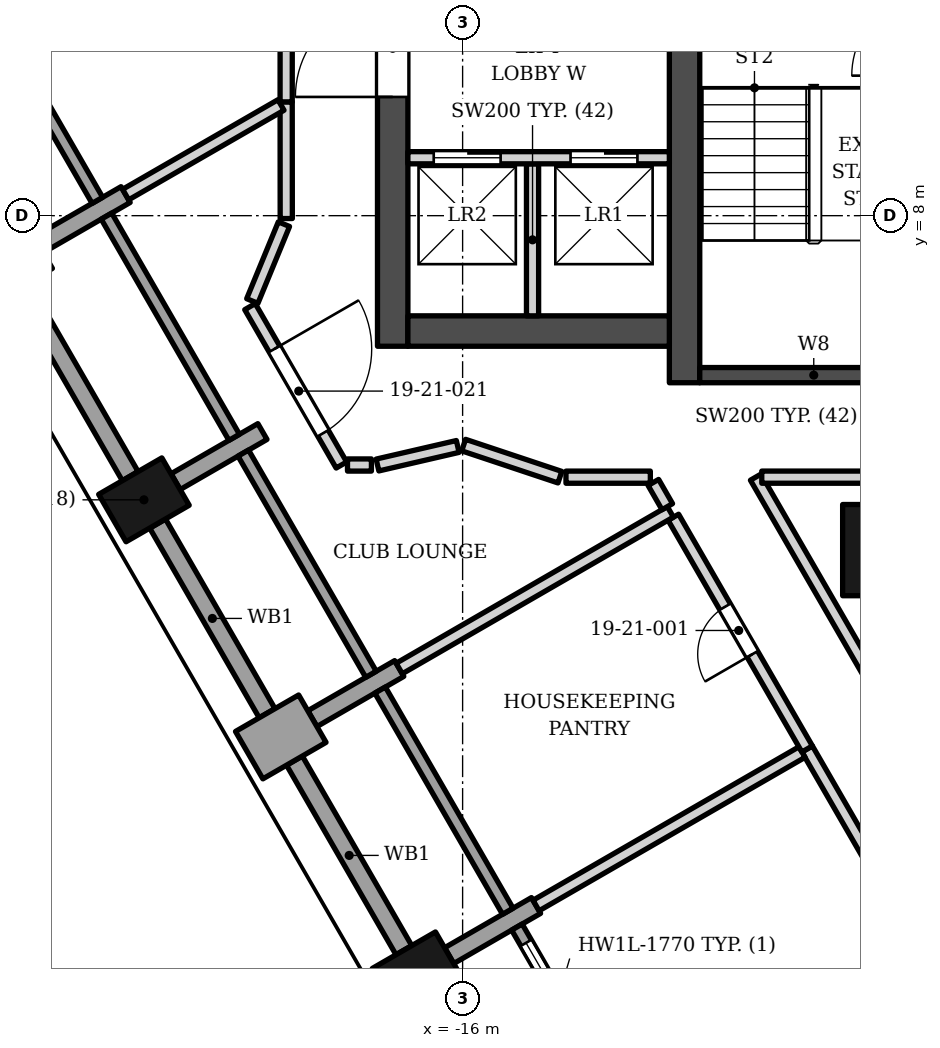
"""IFC4 building model, lengths in metres.
Left out: names, types, materials, properties, quantities, classifications, styles, units other than length and angle.
Written with IfcOpenShell. Run it as: python <this file> out.ifc"""

import sys

from ifc_helpers import new_model, si_unit, direction, frame, frame_2d, origin, origin_2d, place, context, subcontext, project, spatial, rectangle, extrude, element, fill, save


model = new_model("IFC4")
c1 = context("Model", 3, precision=1e-05, world=origin(), true_north=direction((0.0, 1.0)))
c2 = subcontext(c1, "Body", "Model", "MODEL_VIEW")
j1 = project(units=[si_unit("LENGTHUNIT", "METRE"), si_unit("PLANEANGLEUNIT", "RADIAN")], contexts=[c1])
p1 = place(None, origin())
s1 = spatial("IfcSite", under=j1, at=p1, CompositionType="ELEMENT")
p2 = place(p1, origin())
s2 = spatial("IfcBuilding", under=s1, at=p2, CompositionType="ELEMENT")
p3 = place(p2, frame((0.0, 0.0, 91.8)))
s3 = spatial("IfcBuildingStorey", under=s2, at=p3, CompositionType="ELEMENT", Elevation=91.8)
p4 = place(p3, frame((-12.35, 5.253, 0.0), z_axis=(0.0, 0.0, 1.0), x_axis=(0.0, 1.0, 0.0)))
e1 = element("IfcWall", 1, at=p4, inside=s3, PredefinedType="SHEAR", context=c2, shape_type="SweptSolid", body=[
    extrude(rectangle(XDim=13.3, YDim=0.5, at=frame_2d((6.65, 0.0))), origin(), (0.0, 0.0, 1.0), 3.4),
])
p5 = place(p3, frame((-12.1, 5.378, 0.0), z_axis=(0.0, 0.0, 1.0), x_axis=(1.0, 0.0, 0.0)))
e2 = element("IfcWall", 2, at=p5, inside=s3, PredefinedType="SHEAR", context=c2, shape_type="SweptSolid", body=[
    extrude(rectangle(XDim=3.75, YDim=0.25, at=frame_2d((1.875, 0.0))), origin(), (0.0, 0.0, 1.0), 3.4),
])
p6 = place(p3, frame((-12.6, 6.103, 0.0), z_axis=(0.0, 0.0, 1.0), x_axis=(-1.0, 0.0, 0.0)))
e3 = element("IfcWall", 3, at=p6, inside=s3, PredefinedType="SHEAR", context=c2, shape_type="SweptSolid", body=[
    extrude(rectangle(XDim=4.3, YDim=0.5, at=frame_2d((2.15, 0.0))), origin(), (0.0, 0.0, 1.0), 3.4),
])
p7 = place(p3, frame((-17.15, 5.853, 0.0), z_axis=(0.0, 0.0, 1.0), x_axis=(0.0, 1.0, 0.0)))
e4 = element("IfcWall", 4, at=p7, inside=s3, PredefinedType="SHEAR", context=c2, shape_type="SweptSolid", body=[
    extrude(rectangle(XDim=13.2, YDim=0.5, at=frame_2d((6.6, 0.0))), origin(), (0.0, 0.0, 1.0), 3.4),
])
p8 = place(p7, frame((4.1, 0.0, 0.0)))
e5 = element("IfcOpeningElement", 5, at=p8, cuts=e4, PredefinedType="OPENING", context=c2, shape_type="SweptSolid", body=[
    extrude(rectangle(XDim=1.6, YDim=2.1, at=frame_2d((0.8, 1.05))), frame((0.0, 0.26, 0.0), z_axis=(0.0, -1.0, 0.0), x_axis=(1.0, 0.0, 0.0)), (0.0, 0.0, 1.0), 0.52),
])
p9 = place(p7, frame((9.75, 0.0, 0.0)))
e6 = element("IfcOpeningElement", 6, at=p9, cuts=e4, PredefinedType="OPENING", context=c2, shape_type="SweptSolid", body=[
    extrude(rectangle(XDim=0.9, YDim=2.1, at=frame_2d((0.45, 1.05))), frame((0.0, 0.26, 0.0), z_axis=(0.0, -1.0, 0.0), x_axis=(1.0, 0.0, 0.0)), (0.0, 0.0, 1.0), 0.52),
])
p10 = place(p3, frame((-9.0, 2.5, 0.0), z_axis=(0.0, 0.0, 1.0), x_axis=(1.0, 0.0, 0.0)))
e7 = element("IfcColumn", 7, at=p10, inside=s3, PredefinedType="COLUMN", context=c2, shape_type="SweptSolid", body=[
    extrude(rectangle(XDim=1.5, YDim=1.5, at=origin_2d()), origin(), (0.0, 0.0, 1.0), 3.4),
])
for number, where, z_axis, x_axis in (
    (8, (-21.241, 3.327, 0.0), (0.0, 0.0, 1.0), (0.5, -0.866, 0.0)),
    (9, (-16.741, -4.469, 0.0), (0.0, 0.0, 1.0), (0.5, -0.866, 0.0)),
):
    element("IfcColumn", number, at=place(p3, frame(where, z_axis=z_axis, x_axis=x_axis)), inside=s3, PredefinedType="COLUMN", context=c2, shape_type="SweptSolid", body=[
        extrude(rectangle(XDim=0.9, YDim=1.2, at=origin_2d()), origin(), (0.0, 0.0, 1.0), 3.4),
    ])
p11 = place(p3, frame((-24.01, 6.922, 0.0), z_axis=(0.0, 0.0, 1.0), x_axis=(0.865955154139, 0.50012165622, 0.0)))
e10 = element("IfcWall", 10, at=p11, inside=s3, PredefinedType="SOLIDWALL", context=c2, shape_type="SweptSolid", body=[
    extrude(rectangle(XDim=1.2, YDim=0.9, at=frame_2d((0.6, 0.0))), origin(), (0.0, 0.0, 1.0), 2.63),
])
p12 = place(p3, frame((-22.971, 7.522, 0.0), z_axis=(0.0, 0.0, 1.0), x_axis=(0.866040211805, 0.499974350878, 0.0)))
e11 = element("IfcWall", 11, at=p12, inside=s3, PredefinedType="SOLIDWALL", context=c2, shape_type="SweptSolid", body=[
    extrude(rectangle(XDim=1.65, YDim=0.3, at=frame_2d((0.825, 0.0))), origin(), (0.0, 0.0, 1.0), 2.65),
])
p13 = place(p3, frame((-19.292, 4.45, 0.0), z_axis=(0.0, 0.0, 1.0), x_axis=(-0.865993292597, -0.500055614084, 0.0)))
e12 = element("IfcWall", 12, at=p13, inside=s3, PredefinedType="SOLIDWALL", context=c2, shape_type="SweptSolid", body=[
    extrude(rectangle(XDim=1.649, YDim=0.3, at=frame_2d((0.825, 0.0))), origin(), (0.0, 0.0, 1.0), 2.45),
])
p14 = place(p3, frame((-19.51, -0.872, 0.0), z_axis=(0.0, 0.0, 1.0), x_axis=(0.865955154139, 0.50012165622, 0.0)))
e13 = element("IfcWall", 13, at=p14, inside=s3, PredefinedType="SOLIDWALL", context=c2, shape_type="SweptSolid", body=[
    extrude(rectangle(XDim=1.2, YDim=0.9, at=frame_2d((0.6, 0.0))), origin(), (0.0, 0.0, 1.0), 2.63),
])
p15 = place(p3, frame((-17.042, 0.553, 0.0), z_axis=(0.0, 0.0, 1.0), x_axis=(-0.866040211805, -0.499974350878, 0.0)))
e14 = element("IfcWall", 14, at=p15, inside=s3, PredefinedType="SOLIDWALL", context=c2, shape_type="SweptSolid", body=[
    extrude(rectangle(XDim=1.65, YDim=0.3, at=frame_2d((0.825, 0.0))), origin(), (0.0, 0.0, 1.0), 2.65),
])
p16 = place(p3, frame((-16.221, -4.169, 0.0), z_axis=(0.0, 0.0, 1.0), x_axis=(0.865976140824, 0.500085316245, 0.0)))
e15 = element("IfcWall", 15, at=p16, inside=s3, PredefinedType="SOLIDWALL", context=c2, shape_type="SweptSolid", body=[
    extrude(rectangle(XDim=1.65, YDim=0.3, at=frame_2d((0.825, 0.0))), origin(), (0.0, 0.0, 1.0), 2.65),
])
p17 = place(p3, frame((-24.107, 11.889, 0.0), z_axis=(0.0, 0.0, 1.0), x_axis=(0.500027713859, -0.866009402589, 0.0)))
e16 = element("IfcWall", 16, at=p17, inside=s3, PredefinedType="ELEMENTEDWALL", context=c2, shape_type="SweptSolid", body=[
    extrude(rectangle(XDim=4.2, YDim=0.2, at=frame_2d((2.1, 0.0))), origin(), (0.0, 0.0, 1.0), 2.65),
])
p18 = place(p3, frame((-21.467, 3.716, 0.0), z_axis=(0.0, 0.0, 1.0), x_axis=(-0.499984792966, 0.866034183392, 0.0)))
e17 = element("IfcWall", 17, at=p18, inside=s3, PredefinedType="SOLIDWALL", context=c2, shape_type="SweptSolid", body=[
    extrude(rectangle(XDim=3.598, YDim=0.3, at=frame_2d((1.799, 0.0))), origin(), (0.0, 0.0, 1.0), 2.63),
])
p19 = place(p3, frame((-21.857, 7.992, 0.0), z_axis=(0.0, 0.0, 1.0), x_axis=(0.500002543286, -0.866023935413, 0.0)))
e18 = element("IfcWall", 18, at=p19, inside=s3, PredefinedType="ELEMENTEDWALL", context=c2, shape_type="SweptSolid", body=[
    extrude(rectangle(XDim=4.2, YDim=0.2, at=frame_2d((2.1, 0.0))), origin(), (0.0, 0.0, 1.0), 2.65),
])
p20 = place(p3, frame((-21.016, 2.935, 0.0), z_axis=(0.0, 0.0, 1.0), x_axis=(0.499961193289, -0.866047807691, 0.0)))
e19 = element("IfcWall", 19, at=p20, inside=s3, PredefinedType="SOLIDWALL", context=c2, shape_type="SweptSolid", body=[
    extrude(rectangle(XDim=3.6, YDim=0.3, at=frame_2d((1.8, 0.0))), origin(), (0.0, 0.0, 1.0), 2.63),
])
p21 = place(p3, frame((-19.607, 4.095, 0.0), z_axis=(0.0, 0.0, 1.0), x_axis=(0.500027713859, -0.866009402589, 0.0)))
e20 = element("IfcWall", 20, at=p21, inside=s3, PredefinedType="ELEMENTEDWALL", context=c2, shape_type="SweptSolid", body=[
    extrude(rectangle(XDim=4.2, YDim=0.2, at=frame_2d((2.1, 0.0))), origin(), (0.0, 0.0, 1.0), 2.45),
])
p22 = place(p3, frame((-18.766, -0.962, 0.0), z_axis=(0.0, 0.0, 1.0), x_axis=(0.499961193289, -0.866047807691, 0.0)))
e21 = element("IfcWall", 21, at=p22, inside=s3, PredefinedType="SOLIDWALL", context=c2, shape_type="SweptSolid", body=[
    extrude(rectangle(XDim=3.6, YDim=0.3, at=frame_2d((1.8, 0.0))), origin(), (0.0, 0.0, 1.0), 2.63),
])
p23 = place(p3, frame((-17.357, 0.198, 0.0), z_axis=(0.0, 0.0, 1.0), x_axis=(0.500027713859, -0.866009402589, 0.0)))
e22 = element("IfcWall", 22, at=p23, inside=s3, PredefinedType="ELEMENTEDWALL", context=c2, shape_type="SweptSolid", body=[
    extrude(rectangle(XDim=4.2, YDim=0.2, at=frame_2d((2.1, 0.0))), origin(), (0.0, 0.0, 1.0), 2.65),
])
p24 = place(p3, frame((-15.107, -3.699, 0.0), z_axis=(0.0, 0.0, 1.0), x_axis=(0.500002543286, -0.866023935413, 0.0)))
e23 = element("IfcWall", 23, at=p24, inside=s3, PredefinedType="ELEMENTEDWALL", context=c2, shape_type="SweptSolid", body=[
    extrude(rectangle(XDim=4.2, YDim=0.2, at=frame_2d((2.1, 0.0))), origin(), (0.0, 0.0, 1.0), 2.473),
])
p25 = place(p24, frame((0.3, 0.0, 0.6)))
e24 = element("IfcOpeningElement", 24, at=p25, cuts=e23, PredefinedType="OPENING", context=c2, shape_type="SweptSolid", body=[
    extrude(rectangle(XDim=2.1, YDim=1.77, at=frame_2d((1.05, 0.885))), frame((0.0, 0.11, 0.0), z_axis=(0.0, -1.0, 0.0), x_axis=(1.0, 0.0, 0.0)), (0.0, 0.0, 1.0), 0.22),
])
p26 = place(p24, frame((2.7, 0.0, 0.0)))
e25 = element("IfcOpeningElement", 25, at=p26, cuts=e23, PredefinedType="OPENING", context=c2, shape_type="SweptSolid", body=[
    extrude(rectangle(XDim=1.2, YDim=2.37, at=frame_2d((0.6, 1.185))), frame((0.0, 0.11, 0.0), z_axis=(0.0, -1.0, 0.0), x_axis=(1.0, 0.0, 0.0)), (0.0, 0.0, 1.0), 0.22),
])
p27 = place(p3, frame((-14.85, 6.353, 0.0), z_axis=(0.0, 0.0, 1.0), x_axis=(0.0, 1.0, 0.0)))
e26 = element("IfcWall", 26, at=p27, inside=s3, PredefinedType="SOLIDWALL", context=c2, shape_type="SweptSolid", body=[
    extrude(rectangle(XDim=2.5, YDim=0.2, at=frame_2d((1.25, 0.0))), origin(), (0.0, 0.0, 1.0), 3.23),
])
p28 = place(p3, frame((-16.9, 8.953, 0.0), z_axis=(0.0, 0.0, 1.0), x_axis=(1.0, 0.0, 0.0)))
e27 = element("IfcWall", 27, at=p28, inside=s3, PredefinedType="SOLIDWALL", context=c2, shape_type="SweptSolid", body=[
    extrude(rectangle(XDim=4.3, YDim=0.2, at=frame_2d((2.15, 0.0))), origin(), (0.0, 0.0, 1.0), 3.23),
])
p29 = place(p28, frame((2.675, 0.0, 0.0)))
e28 = element("IfcOpeningElement", 28, at=p29, cuts=e27, PredefinedType="OPENING", context=c2, shape_type="SweptSolid", body=[
    extrude(rectangle(XDim=1.1, YDim=2.1, at=frame_2d((0.55, 1.05))), frame((0.0, 0.11, 0.0), z_axis=(0.0, -1.0, 0.0), x_axis=(1.0, 0.0, 0.0)), (0.0, 0.0, 1.0), 0.22),
])
p30 = place(p28, frame((0.425, 0.0, 0.0)))
e29 = element("IfcOpeningElement", 29, at=p30, cuts=e27, PredefinedType="OPENING", context=c2, shape_type="SweptSolid", body=[
    extrude(rectangle(XDim=1.1, YDim=2.1, at=frame_2d((0.55, 1.05))), frame((0.0, 0.11, 0.0), z_axis=(0.0, -1.0, 0.0), x_axis=(1.0, 0.0, 0.0)), (0.0, 0.0, 1.0), 0.22),
])
p31 = place(p3, frame((-10.334, -0.77, 0.0), z_axis=(0.0, 0.0, 1.0), x_axis=(0.499996405163, -0.866027479255, 0.0)))
e30 = element("IfcWall", 30, at=p31, inside=s3, PredefinedType="PARTITIONING", context=c2, shape_type="SweptSolid", body=[
    extrude(rectangle(XDim=20.803, YDim=0.2, at=frame_2d((10.401, 0.0))), origin(), (0.0, 0.0, 1.0), 2.384),
])
p32 = place(p31, frame((4.0, 0.0, 0.0)))
e31 = element("IfcOpeningElement", 31, at=p32, cuts=e30, PredefinedType="OPENING", context=c2, shape_type="SweptSolid", body=[
    extrude(rectangle(XDim=1.0, YDim=2.1, at=frame_2d((0.5, 1.05))), frame((0.0, 0.11, 0.0), z_axis=(0.0, -1.0, 0.0), x_axis=(1.0, 0.0, 0.0)), (0.0, 0.0, 1.0), 0.22),
])
p33 = place(p31, frame((9.7, 0.0, 0.0)))
e32 = element("IfcOpeningElement", 32, at=p33, cuts=e30, PredefinedType="OPENING", context=c2, shape_type="SweptSolid", body=[
    extrude(rectangle(XDim=1.0, YDim=2.1, at=frame_2d((0.5, 1.05))), frame((0.0, 0.11, 0.0), z_axis=(0.0, -1.0, 0.0), x_axis=(1.0, 0.0, 0.0)), (0.0, 0.0, 1.0), 0.22),
])
p34 = place(p31, frame((16.6, 0.0, 0.0)))
e33 = element("IfcOpeningElement", 33, at=p34, cuts=e30, PredefinedType="OPENING", context=c2, shape_type="SweptSolid", body=[
    extrude(rectangle(XDim=1.1, YDim=2.1, at=frame_2d((0.55, 1.05))), frame((0.0, 0.11, 0.0), z_axis=(0.0, -1.0, 0.0), x_axis=(1.0, 0.0, 0.0)), (0.0, 0.0, 1.0), 0.22),
])
p35 = place(p31, frame((18.852, 0.0, 0.0)))
e34 = element("IfcOpeningElement", 34, at=p35, cuts=e30, PredefinedType="OPENING", context=c2, shape_type="SweptSolid", body=[
    extrude(rectangle(XDim=1.1, YDim=2.1, at=frame_2d((0.55, 1.05))), frame((0.0, 0.11, 0.0), z_axis=(0.0, -1.0, 0.0), x_axis=(1.0, 0.0, 0.0)), (0.0, 0.0, 1.0), 0.22),
])
p36 = place(p3, frame((-14.792, -3.344, 0.0), z_axis=(0.0, 0.0, 1.0), x_axis=(0.866188805601, 0.49971687289, 0.0)))
e35 = element("IfcWall", 35, at=p36, inside=s3, PredefinedType="PARTITIONING", context=c2, shape_type="SweptSolid", body=[
    extrude(rectangle(XDim=5.05, YDim=0.2, at=frame_2d((2.525, 0.0))), origin(), (0.0, 0.0, 1.0), 2.473),
])
p37 = place(p3, frame((-12.534, 3.04, 0.0), z_axis=(0.0, 0.0, 1.0), x_axis=(0.50001224981, -0.866018331238, 0.0)))
e36 = element("IfcWall", 36, at=p37, inside=s3, PredefinedType="PARTITIONING", context=c2, shape_type="SweptSolid", body=[
    extrude(rectangle(XDim=4.4, YDim=0.2, at=frame_2d((2.2, 0.0))), origin(), (0.0, 0.0, 1.0), 3.23),
])
p38 = place(p37, frame((1.7, 0.0, 0.0)))
e37 = element("IfcOpeningElement", 37, at=p38, cuts=e36, PredefinedType="OPENING", context=c2, shape_type="SweptSolid", body=[
    extrude(rectangle(XDim=0.9, YDim=2.1, at=frame_2d((0.45, 1.05))), frame((0.0, 0.11, 0.0), z_axis=(0.0, -1.0, 0.0), x_axis=(1.0, 0.0, 0.0)), (0.0, 0.0, 1.0), 0.22),
])
p39 = place(p3, frame((-17.042, 0.553, 0.0), z_axis=(0.0, 0.0, 1.0), x_axis=(0.865896561189, 0.500223095549, 0.0)))
e38 = element("IfcWall", 38, at=p39, inside=s3, PredefinedType="PARTITIONING", context=c2, shape_type="SweptSolid", body=[
    extrude(rectangle(XDim=5.15, YDim=0.2, at=frame_2d((2.575, 0.0))), origin(), (0.0, 0.0, 1.0), 2.473),
])
p40 = place(p3, frame((-12.863, 3.613, 0.0), z_axis=(0.0, 0.0, 1.0), x_axis=(0.49808198686, -0.867129940877, 0.0)))
e39 = element("IfcWall", 39, at=p40, inside=s3, PredefinedType="PARTITIONING", context=c2, shape_type="SweptSolid", body=[
    extrude(rectangle(XDim=0.46, YDim=0.2, at=frame_2d((0.23, 0.0))), origin(), (0.0, 0.0, 1.0), 3.23),
])
p41 = place(p3, frame((-15.983, 4.227, 0.0), z_axis=(0.0, 0.0, 1.0), x_axis=(0.948683298051, -0.316227766017, 0.0)))
e40 = element("IfcWall", 40, at=p41, inside=s3, PredefinedType="PARTITIONING", context=c2, shape_type="SweptSolid", body=[
    extrude(rectangle(XDim=1.668, YDim=0.2, at=frame_2d((0.834, 0.0))), origin(), (0.0, 0.0, 1.0), 3.23),
])
p42 = place(p3, frame((-14.3, 3.699, 0.0), z_axis=(0.0, 0.0, 1.0), x_axis=(1.0, 0.0, 0.0)))
e41 = element("IfcWall", 41, at=p42, inside=s3, PredefinedType="PARTITIONING", context=c2, shape_type="SweptSolid", body=[
    extrude(rectangle(XDim=1.387, YDim=0.2, at=frame_2d((0.694, 0.0))), origin(), (0.0, 0.0, 1.0), 2.473),
])
p43 = place(p3, frame((-11.18, 3.7, 0.0), z_axis=(0.0, 0.0, 1.0), x_axis=(0.500129162475, -0.865950818951, 0.0)))
e42 = element("IfcWall", 42, at=p43, inside=s3, PredefinedType="PARTITIONING", context=c2, shape_type="SweptSolid", body=[
    extrude(rectangle(XDim=22.499, YDim=0.2, at=frame_2d((11.249, 0.0))), origin(), (0.0, 0.0, 1.0), 2.384),
])
p44 = place(p43, frame((9.13, 0.0, 0.0)))
e43 = element("IfcOpeningElement", 43, at=p44, cuts=e42, PredefinedType="OPENING", context=c2, shape_type="SweptSolid", body=[
    extrude(rectangle(XDim=1.0, YDim=2.1, at=frame_2d((0.5, 1.05))), frame((0.0, 0.11, 0.0), z_axis=(0.0, -1.0, 0.0), x_axis=(1.0, 0.0, 0.0)), (0.0, 0.0, 1.0), 0.22),
])
p45 = place(p43, frame((15.111, 0.0, 0.0)))
e44 = element("IfcOpeningElement", 44, at=p45, cuts=e42, PredefinedType="OPENING", context=c2, shape_type="SweptSolid", body=[
    extrude(rectangle(XDim=1.0, YDim=2.1, at=frame_2d((0.5, 1.05))), frame((0.0, 0.11, 0.0), z_axis=(0.0, -1.0, 0.0), x_axis=(1.0, 0.0, 0.0)), (0.0, 0.0, 1.0), 0.22),
])
p46 = place(p43, frame((5.834, 0.0, 0.0)))
e45 = element("IfcOpeningElement", 45, at=p46, cuts=e42, PredefinedType="OPENING", context=c2, shape_type="SweptSolid", body=[
    extrude(rectangle(XDim=1.0, YDim=2.1, at=frame_2d((0.5, 1.05))), frame((0.0, 0.11, 0.0), z_axis=(0.0, -1.0, 0.0), x_axis=(1.0, 0.0, 0.0)), (0.0, 0.0, 1.0), 0.22),
])
p47 = place(p3, frame((-11.08, 3.7, 0.0), z_axis=(0.0, 0.0, 1.0), x_axis=(1.0, 0.0, 0.0)))
e46 = element("IfcWall", 46, at=p47, inside=s3, PredefinedType="PARTITIONING", context=c2, shape_type="SweptSolid", body=[
    extrude(rectangle(XDim=5.08, YDim=0.2, at=frame_2d((2.54, 0.0))), origin(), (0.0, 0.0, 1.0), 2.832),
])
p48 = place(p3, frame((-19.497, 6.504, 0.0), z_axis=(0.0, 0.0, 1.0), x_axis=(0.499928597019, -0.86606662439, 0.0)))
e47 = element("IfcWall", 47, at=p48, inside=s3, PredefinedType="PARTITIONING", context=c2, shape_type="SweptSolid", body=[
    extrude(rectangle(XDim=3.007, YDim=0.2, at=frame_2d((1.504, 0.0))), origin(), (0.0, 0.0, 1.0), 2.45),
])
p49 = place(p48, frame((0.804, 0.0, 0.0)))
e48 = element("IfcOpeningElement", 48, at=p49, cuts=e47, PredefinedType="OPENING", context=c2, shape_type="SweptSolid", body=[
    extrude(rectangle(XDim=1.6, YDim=2.1, at=frame_2d((0.8, 1.05))), frame((0.0, 0.11, 0.0), z_axis=(0.0, -1.0, 0.0), x_axis=(1.0, 0.0, 0.0)), (0.0, 0.0, 1.0), 0.22),
])
p50 = place(p3, frame((-17.893, 3.899, 0.0), z_axis=(0.0, 0.0, 1.0), x_axis=(1.0, 0.0, 0.0)))
e49 = element("IfcWall", 49, at=p50, inside=s3, PredefinedType="PARTITIONING", context=c2, shape_type="SweptSolid", body=[
    extrude(rectangle(XDim=0.393, YDim=0.2, at=frame_2d((0.197, 0.0))), origin(), (0.0, 0.0, 1.0), 3.23),
])
p51 = place(p3, frame((-17.4, 3.899, 0.0), z_axis=(0.0, 0.0, 1.0), x_axis=(0.974284755848, 0.225320248808, 0.0)))
e50 = element("IfcWall", 50, at=p51, inside=s3, PredefinedType="PARTITIONING", context=c2, shape_type="SweptSolid", body=[
    extrude(rectangle(XDim=1.354, YDim=0.2, at=frame_2d((0.677, 0.0))), origin(), (0.0, 0.0, 1.0), 3.23),
])
p52 = place(p3, frame((-19.459, 6.597, 0.0), z_axis=(0.0, 0.0, 1.0), x_axis=(0.380767778943, 0.92467069734, 0.0)))
e51 = element("IfcWall", 51, at=p52, inside=s3, PredefinedType="PARTITIONING", context=c2, shape_type="SweptSolid", body=[
    extrude(rectangle(XDim=1.366, YDim=0.2, at=frame_2d((0.683, 0.0))), origin(), (0.0, 0.0, 1.0), 3.23),
])
p53 = place(p3, frame((-18.902, 9.871, 0.0), z_axis=(0.0, 0.0, 1.0), x_axis=(0.000890698209, -0.999999603328, 0.0)))
e52 = element("IfcWall", 52, at=p53, inside=s3, PredefinedType="PARTITIONING", context=c2, shape_type="SweptSolid", body=[
    extrude(rectangle(XDim=1.919, YDim=0.2, at=frame_2d((0.959, 0.0))), origin(), (0.0, 0.0, 1.0), 3.23),
])
p54 = place(p3, frame((-21.542, 8.347, 0.0), z_axis=(0.0, 0.0, 1.0), x_axis=(0.866346792864, 0.499442924161, 0.0)))
e53 = element("IfcWall", 53, at=p54, inside=s3, PredefinedType="PARTITIONING", context=c2, shape_type="SweptSolid", body=[
    extrude(rectangle(XDim=2.949, YDim=0.2, at=frame_2d((1.475, 0.0))), origin(), (0.0, 0.0, 1.0), 3.23),
])
p55 = place(p3, frame((-18.902, 9.872, 0.0), z_axis=(0.0, 0.0, 1.0), x_axis=(0.000477261826, 0.999999886111, 0.0)))
e54 = element("IfcWall", 54, at=p55, inside=s3, PredefinedType="PARTITIONING", context=c2, shape_type="SweptSolid", body=[
    extrude(rectangle(XDim=3.581, YDim=0.2, at=frame_2d((1.791, 0.0))), origin(), (0.0, 0.0, 1.0), 3.23),
])
p56 = place(p55, frame((1.291, 0.0, 0.0)))
e55 = element("IfcOpeningElement", 55, at=p56, cuts=e54, PredefinedType="OPENING", context=c2, shape_type="SweptSolid", body=[
    extrude(rectangle(XDim=1.0, YDim=2.1, at=frame_2d((0.5, 1.05))), frame((0.0, 0.11, 0.0), z_axis=(0.0, -1.0, 0.0), x_axis=(1.0, 0.0, 0.0)), (0.0, 0.0, 1.0), 0.22),
])
p57 = place(p25, origin())
e56 = element("IfcWindow", 56, at=p57, inside=s3, PartitioningType="SINGLE_PANEL", PredefinedType="WINDOW", context=c2, shape_type="SweptSolid", body=[
    extrude(rectangle(XDim=2.1, YDim=1.77, at=frame_2d((1.05, 0.885))), frame((0.0, 0.03, 0.0), z_axis=(0.0, -1.0, 0.0), x_axis=(1.0, 0.0, 0.0)), (0.0, 0.0, 1.0), 0.06),
])
fill(e24, e56)
p58 = place(p29, origin())
e57 = element("IfcDoor", 57, at=p58, inside=s3, OperationType="DOUBLE_DOOR_SLIDING", PredefinedType="DOOR", context=c2, shape_type="SweptSolid", body=[
    extrude(rectangle(XDim=1.1, YDim=2.1, at=frame_2d((0.55, 1.05))), frame((0.0, 0.025, 0.0), z_axis=(0.0, -1.0, 0.0), x_axis=(1.0, 0.0, 0.0)), (0.0, 0.0, 1.0), 0.05),
])
fill(e28, e57)
p59 = place(p30, origin())
e58 = element("IfcDoor", 58, at=p59, inside=s3, OperationType="DOUBLE_DOOR_SLIDING", PredefinedType="DOOR", context=c2, shape_type="SweptSolid", body=[
    extrude(rectangle(XDim=1.1, YDim=2.1, at=frame_2d((0.55, 1.05))), frame((0.0, 0.025, 0.0), z_axis=(0.0, -1.0, 0.0), x_axis=(1.0, 0.0, 0.0)), (0.0, 0.0, 1.0), 0.05),
])
fill(e29, e58)
p60 = place(p8, origin())
e59 = element("IfcDoor", 59, at=p60, inside=s3, OperationType="DOUBLE_DOOR_SINGLE_SWING", PredefinedType="DOOR", context=c2, shape_type="SweptSolid", body=[
    extrude(rectangle(XDim=1.6, YDim=2.1, at=frame_2d((0.8, 1.05))), frame((0.0, 0.025, 0.0), z_axis=(0.0, -1.0, 0.0), x_axis=(1.0, 0.0, 0.0)), (0.0, 0.0, 1.0), 0.05),
])
fill(e5, e59)
p61 = place(p38, origin())
e60 = element("IfcDoor", 60, at=p61, inside=s3, OperationType="SINGLE_SWING_RIGHT", PredefinedType="DOOR", context=c2, shape_type="SweptSolid", body=[
    extrude(rectangle(XDim=0.9, YDim=2.1, at=frame_2d((0.45, 1.05))), frame((0.0, 0.025, 0.0), z_axis=(0.0, -1.0, 0.0), x_axis=(1.0, 0.0, 0.0)), (0.0, 0.0, 1.0), 0.05),
])
fill(e37, e60)
p62 = place(p49, origin())
e61 = element("IfcDoor", 61, at=p62, inside=s3, OperationType="DOUBLE_DOOR_SINGLE_SWING", PredefinedType="DOOR", context=c2, shape_type="SweptSolid", body=[
    extrude(rectangle(XDim=1.6, YDim=2.1, at=frame_2d((0.8, 1.05))), frame((0.0, 0.025, 0.0), z_axis=(0.0, -1.0, 0.0), x_axis=(1.0, 0.0, 0.0)), (0.0, 0.0, 1.0), 0.05),
])
fill(e48, e61)
save(model, sys.argv[1])
